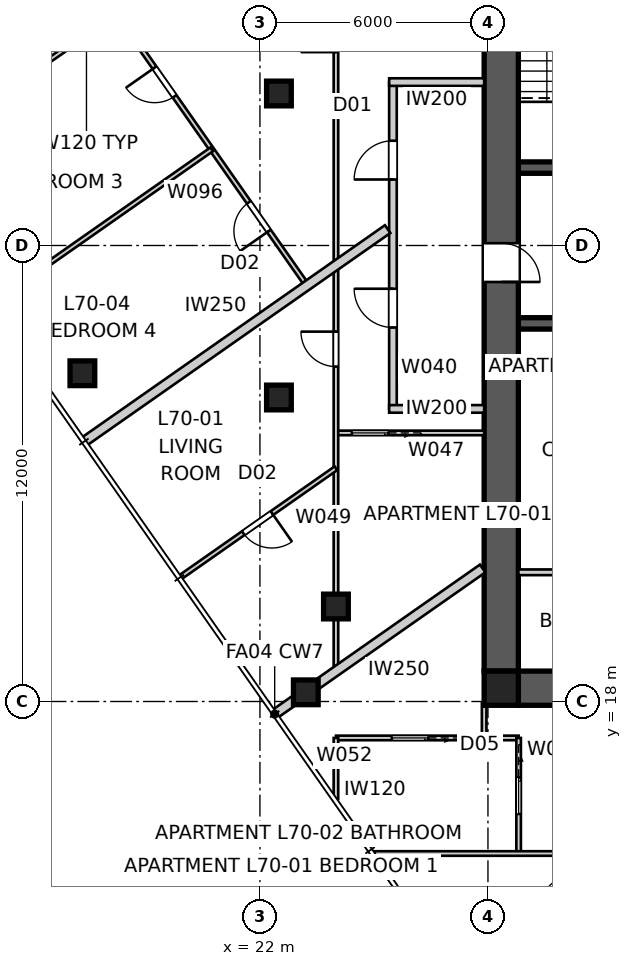
"""IFC4 building model, lengths in metres.
Left out: names, types, materials, properties, quantities, classifications, styles, units other than length and angle.
Written with IfcOpenShell. Run it as: python <this file> out.ifc"""

import sys

from ifc_helpers import new_model, si_unit, direction, frame, frame_2d, origin, origin_2d, place, context, subcontext, project, spatial, polyline, rectangle, outline, extrude, element, fill, save


model = new_model("IFC4")
c1 = context("Model", 3, precision=1e-05, world=origin(), true_north=direction((0.0, 1.0)))
c2 = subcontext(c1, "Body", "Model", "MODEL_VIEW")
j1 = project(units=[si_unit("LENGTHUNIT", "METRE"), si_unit("PLANEANGLEUNIT", "RADIAN")], contexts=[c1])
p1 = place(None, origin())
s1 = spatial("IfcSite", under=j1, at=p1, CompositionType="ELEMENT")
p2 = place(p1, origin())
s2 = spatial("IfcBuilding", under=s1, at=p2, CompositionType="ELEMENT")
p3 = place(p2, frame((0.0, 0.0, 254.0)))
s3 = spatial("IfcBuildingStorey", under=s2, at=p3, CompositionType="ELEMENT", Elevation=254.0)
p4 = place(p3, frame((51.2, 18.35, 0.0), z_axis=(0.0, 0.0, 1.0), x_axis=(-1.0, 0.0, 0.0)))
e1 = element("IfcWall", 1, at=p4, inside=s3, PredefinedType="SHEAR", context=c2, shape_type="SweptSolid", body=[
    extrude(outline(polyline([(0.0, -0.45), (22.4, -0.45), (22.4, -0.025), (22.85, -0.025), (22.85, 0.025), (22.4, 0.025), (22.4, 0.45), (0.0, 0.45), (0.0, 0.025), (-0.45, 0.025), (-0.45, -0.025), (0.0, -0.025), (0.0, -0.45)])), origin(), (0.0, 0.0, 1.0), 3.4),
])
p5 = place(p3, frame((28.35, 41.2, 0.0), z_axis=(0.0, 0.0, 1.0), x_axis=(0.0, -1.0, 0.0)))
e2 = element("IfcWall", 2, at=p5, inside=s3, PredefinedType="SHEAR", context=c2, shape_type="SweptSolid", body=[
    extrude(outline(polyline([(0.0, -0.45), (22.4, -0.45), (22.4, -0.025), (22.85, -0.025), (22.85, 0.025), (22.4, 0.025), (22.4, 0.45), (0.0, 0.45), (0.0, 0.025), (-0.45, 0.025), (-0.45, -0.025), (0.0, -0.025), (0.0, -0.45)])), origin(), (0.0, 0.0, 1.0), 3.4),
])
p6 = place(p5, frame((11.14, 0.0, 0.0)))
e3 = element("IfcOpeningElement", 3, at=p6, cuts=e2, PredefinedType="OPENING", context=c2, shape_type="SweptSolid", body=[
    extrude(rectangle(XDim=1.02, YDim=2.4, at=frame_2d((0.51, 1.2))), frame((0.0, 0.46, 0.0), z_axis=(0.0, -1.0, 0.0), x_axis=(1.0, 0.0, 0.0)), (0.0, 0.0, 1.0), 0.92),
])
p7 = place(p3, frame((28.8, 32.05, 0.0), z_axis=(0.0, 0.0, 1.0), x_axis=(1.0, 0.0, 0.0)))
e4 = element("IfcWall", 4, at=p7, inside=s3, PredefinedType="SHEAR", context=c2, shape_type="SweptSolid", body=[
    extrude(rectangle(XDim=22.4, YDim=0.3, at=frame_2d((11.2, 0.0))), origin(), (0.0, 0.0, 1.0), 3.4),
])
p8 = place(p7, frame((19.04, 0.0, 0.0)))
e5 = element("IfcOpeningElement", 5, at=p8, cuts=e4, PredefinedType="OPENING", context=c2, shape_type="SweptSolid", body=[
    extrude(rectangle(XDim=0.92, YDim=2.1, at=frame_2d((0.46, 1.05))), frame((0.0, 0.16, 0.0), z_axis=(0.0, -1.0, 0.0), x_axis=(1.0, 0.0, 0.0)), (0.0, 0.0, 1.0), 0.32),
])
p9 = place(p7, frame((1.265, 0.0, 0.0)))
e6 = element("IfcOpeningElement", 6, at=p9, cuts=e4, PredefinedType="OPENING", context=c2, shape_type="SweptSolid", body=[
    extrude(rectangle(XDim=1.02, YDim=2.1, at=frame_2d((0.51, 1.05))), frame((0.0, 0.16, 0.0), z_axis=(0.0, -1.0, 0.0), x_axis=(1.0, 0.0, 0.0)), (0.0, 0.0, 1.0), 0.32),
])
p10 = place(p7, frame((4.015, 0.0, 0.0)))
e7 = element("IfcOpeningElement", 7, at=p10, cuts=e4, PredefinedType="OPENING", context=c2, shape_type="SweptSolid", body=[
    extrude(rectangle(XDim=0.92, YDim=2.1, at=frame_2d((0.46, 1.05))), frame((0.0, 0.16, 0.0), z_axis=(0.0, -1.0, 0.0), x_axis=(1.0, 0.0, 0.0)), (0.0, 0.0, 1.0), 0.32),
])
p11 = place(p7, frame((6.115, 0.0, 0.0)))
e8 = element("IfcOpeningElement", 8, at=p11, cuts=e4, PredefinedType="OPENING", context=c2, shape_type="SweptSolid", body=[
    extrude(rectangle(XDim=0.92, YDim=2.1, at=frame_2d((0.46, 1.05))), frame((0.0, 0.16, 0.0), z_axis=(0.0, -1.0, 0.0), x_axis=(1.0, 0.0, 0.0)), (0.0, 0.0, 1.0), 0.32),
])
p12 = place(p7, frame((9.79, 0.0, 0.0)))
e9 = element("IfcOpeningElement", 9, at=p12, cuts=e4, PredefinedType="OPENING", context=c2, shape_type="SweptSolid", body=[
    extrude(rectangle(XDim=0.92, YDim=2.1, at=frame_2d((0.46, 1.05))), frame((0.0, 0.16, 0.0), z_axis=(0.0, -1.0, 0.0), x_axis=(1.0, 0.0, 0.0)), (0.0, 0.0, 1.0), 0.32),
])
p13 = place(p7, frame((12.05, 0.0, 0.0)))
e10 = element("IfcOpeningElement", 10, at=p13, cuts=e4, PredefinedType="OPENING", context=c2, shape_type="SweptSolid", body=[
    extrude(rectangle(XDim=1.1, YDim=2.1, at=frame_2d((0.55, 1.05))), frame((0.0, 0.16, 0.0), z_axis=(0.0, -1.0, 0.0), x_axis=(1.0, 0.0, 0.0)), (0.0, 0.0, 1.0), 0.32),
])
p14 = place(p7, frame((14.85, 0.0, 0.0)))
e11 = element("IfcOpeningElement", 11, at=p14, cuts=e4, PredefinedType="OPENING", context=c2, shape_type="SweptSolid", body=[
    extrude(rectangle(XDim=1.1, YDim=2.1, at=frame_2d((0.55, 1.05))), frame((0.0, 0.16, 0.0), z_axis=(0.0, -1.0, 0.0), x_axis=(1.0, 0.0, 0.0)), (0.0, 0.0, 1.0), 0.32),
])
p15 = place(p3, frame((51.2, 27.95, 0.0), z_axis=(0.0, 0.0, 1.0), x_axis=(-1.0, 0.0, 0.0)))
e12 = element("IfcWall", 12, at=p15, inside=s3, PredefinedType="SHEAR", context=c2, shape_type="SweptSolid", body=[
    extrude(rectangle(XDim=22.4, YDim=0.3, at=frame_2d((11.2, 0.0))), origin(), (0.0, 0.0, 1.0), 3.4),
])
p16 = place(p15, frame((19.04, 0.0, 0.0)))
e13 = element("IfcOpeningElement", 13, at=p16, cuts=e12, PredefinedType="OPENING", context=c2, shape_type="SweptSolid", body=[
    extrude(rectangle(XDim=0.92, YDim=2.1, at=frame_2d((0.46, 1.05))), frame((0.0, 0.16, 0.0), z_axis=(0.0, -1.0, 0.0), x_axis=(1.0, 0.0, 0.0)), (0.0, 0.0, 1.0), 0.32),
])
p17 = place(p15, frame((1.265, 0.0, 0.0)))
e14 = element("IfcOpeningElement", 14, at=p17, cuts=e12, PredefinedType="OPENING", context=c2, shape_type="SweptSolid", body=[
    extrude(rectangle(XDim=1.02, YDim=2.1, at=frame_2d((0.51, 1.05))), frame((0.0, 0.16, 0.0), z_axis=(0.0, -1.0, 0.0), x_axis=(1.0, 0.0, 0.0)), (0.0, 0.0, 1.0), 0.32),
])
p18 = place(p15, frame((4.015, 0.0, 0.0)))
e15 = element("IfcOpeningElement", 15, at=p18, cuts=e12, PredefinedType="OPENING", context=c2, shape_type="SweptSolid", body=[
    extrude(rectangle(XDim=0.92, YDim=2.1, at=frame_2d((0.46, 1.05))), frame((0.0, 0.16, 0.0), z_axis=(0.0, -1.0, 0.0), x_axis=(1.0, 0.0, 0.0)), (0.0, 0.0, 1.0), 0.32),
])
p19 = place(p15, frame((9.34, 0.0, 0.0)))
e16 = element("IfcOpeningElement", 16, at=p19, cuts=e12, PredefinedType="OPENING", context=c2, shape_type="SweptSolid", body=[
    extrude(rectangle(XDim=0.92, YDim=2.1, at=frame_2d((0.46, 1.05))), frame((0.0, 0.16, 0.0), z_axis=(0.0, -1.0, 0.0), x_axis=(1.0, 0.0, 0.0)), (0.0, 0.0, 1.0), 0.32),
])
p20 = place(p15, frame((7.015, 0.0, 0.0)))
e17 = element("IfcOpeningElement", 17, at=p20, cuts=e12, PredefinedType="OPENING", context=c2, shape_type="SweptSolid", body=[
    extrude(rectangle(XDim=0.92, YDim=2.1, at=frame_2d((0.46, 1.05))), frame((0.0, 0.16, 0.0), z_axis=(0.0, -1.0, 0.0), x_axis=(1.0, 0.0, 0.0)), (0.0, 0.0, 1.0), 0.32),
])
p21 = place(p15, frame((12.05, 0.0, 0.0)))
e18 = element("IfcOpeningElement", 18, at=p21, cuts=e12, PredefinedType="OPENING", context=c2, shape_type="SweptSolid", body=[
    extrude(rectangle(XDim=1.1, YDim=2.1, at=frame_2d((0.55, 1.05))), frame((0.0, 0.16, 0.0), z_axis=(0.0, -1.0, 0.0), x_axis=(1.0, 0.0, 0.0)), (0.0, 0.0, 1.0), 0.32),
])
p22 = place(p15, frame((14.85, 0.0, 0.0)))
e19 = element("IfcOpeningElement", 19, at=p22, cuts=e12, PredefinedType="OPENING", context=c2, shape_type="SweptSolid", body=[
    extrude(rectangle(XDim=1.1, YDim=2.1, at=frame_2d((0.55, 1.05))), frame((0.0, 0.16, 0.0), z_axis=(0.0, -1.0, 0.0), x_axis=(1.0, 0.0, 0.0)), (0.0, 0.0, 1.0), 0.32),
])
p23 = place(p3, frame((28.35, 18.35, 0.0), z_axis=(0.0, 0.0, 1.0), x_axis=(1.0, 0.0, 0.0)))
e20 = element("IfcColumn", 20, at=p23, inside=s3, PredefinedType="COLUMN", context=c2, shape_type="SweptSolid", body=[
    extrude(rectangle(XDim=0.9, YDim=0.9, at=origin_2d()), origin(), (0.0, 0.0, 1.0), 3.4),
])
for number, where, z_axis, x_axis in (
    (21, (17.328, 26.638, 0.0), (0.0, 0.0, 1.0), (1.0, 0.0, 0.0)),
    (22, (23.207, 18.242, 0.0), (0.0, 0.0, 1.0), (1.0, 0.0, 0.0)),
    (23, (22.5, 34.0, 0.0), (0.0, 0.0, 1.0), (1.0, 0.0, 0.0)),
    (24, (22.5, 26.0, 0.0), (0.0, 0.0, 1.0), (1.0, 0.0, 0.0)),
    (25, (24.0, 20.5, 0.0), (0.0, 0.0, 1.0), (1.0, 0.0, 0.0)),
):
    element("IfcColumn", number, at=place(p3, frame(where, z_axis=z_axis, x_axis=x_axis)), inside=s3, PredefinedType="COLUMN", context=c2, shape_type="SweptSolid", body=[
        extrude(rectangle(XDim=0.65, YDim=0.65, at=origin_2d()), origin(), (0.0, 0.0, 1.0), 3.4),
    ])
p24 = place(p3, frame((25.5, 25.7, 0.0), z_axis=(0.0, 0.0, 1.0), x_axis=(0.0, 1.0, 0.0)))
e26 = element("IfcWall", 26, at=p24, inside=s3, PredefinedType="PARTITIONING", context=c2, shape_type="SweptSolid", body=[
    extrude(rectangle(XDim=8.6, YDim=0.2, at=frame_2d((4.3, 0.0))), origin(), (0.0, 0.0, 1.0), 3.25),
])
p25 = place(p24, frame((2.142, 0.0, 0.0)))
e27 = element("IfcOpeningElement", 27, at=p25, cuts=e26, PredefinedType="OPENING", context=c2, shape_type="SweptSolid", body=[
    extrude(rectangle(XDim=1.02, YDim=2.34, at=frame_2d((0.51, 1.17))), frame((0.0, 0.11, 0.0), z_axis=(0.0, -1.0, 0.0), x_axis=(1.0, 0.0, 0.0)), (0.0, 0.0, 1.0), 0.22),
])
p26 = place(p24, frame((6.037, 0.0, 0.0)))
e28 = element("IfcOpeningElement", 28, at=p26, cuts=e26, PredefinedType="OPENING", context=c2, shape_type="SweptSolid", body=[
    extrude(rectangle(XDim=1.02, YDim=2.34, at=frame_2d((0.51, 1.17))), frame((0.0, 0.11, 0.0), z_axis=(0.0, -1.0, 0.0), x_axis=(1.0, 0.0, 0.0)), (0.0, 0.0, 1.0), 0.22),
])
for number, where, z_axis, x_axis in (
    (29, (27.9, 34.3, 0.0), (0.0, 0.0, 1.0), (-1.0, 0.0, 0.0)),
    (30, (27.9, 25.7, 0.0), (0.0, 0.0, 1.0), (-1.0, 0.0, 0.0)),
):
    element("IfcWall", number, at=place(p3, frame(where, z_axis=z_axis, x_axis=x_axis)), inside=s3, PredefinedType="PARTITIONING", context=c2, shape_type="SweptSolid", body=[
        extrude(rectangle(XDim=2.5, YDim=0.2, at=frame_2d((1.25, 0.0))), origin(), (0.0, 0.0, 1.0), 3.25),
    ])
p27 = place(p3, frame((22.388, 17.668, 0.0), z_axis=(0.0, 0.0, 1.0), x_axis=(0.819161528122, 0.573562891796, 0.0)))
e31 = element("IfcWall", 31, at=p27, inside=s3, PredefinedType="PARTITIONING", context=c2, shape_type="SweptSolid", body=[
    extrude(rectangle(XDim=6.681, YDim=0.25, at=frame_2d((3.341, 0.0))), origin(), (0.0, 0.0, 1.0), 3.25),
])
p28 = place(p3, frame((17.369, 24.836, 0.0), z_axis=(0.0, 0.0, 1.0), x_axis=(0.81915902312, 0.573566469418, 0.0)))
e32 = element("IfcWall", 32, at=p28, inside=s3, PredefinedType="PARTITIONING", context=c2, shape_type="SweptSolid", body=[
    extrude(rectangle(XDim=9.756, YDim=0.25, at=frame_2d((4.878, 0.0))), origin(), (0.0, 0.0, 1.0), 3.25),
])
p29 = place(p3, frame((34.25, 21.4, 0.0), z_axis=(0.0, 0.0, 1.0), x_axis=(-1.0, 0.0, 0.0)))
e33 = element("IfcWall", 33, at=p29, inside=s3, PredefinedType="SOLIDWALL", context=c2, shape_type="SweptSolid", body=[
    extrude(rectangle(XDim=5.45, YDim=0.15, at=frame_2d((2.725, 0.0))), origin(), (0.0, 0.0, 1.0), 3.25),
])
p30 = place(p29, frame((2.265, 0.0, 0.0)))
e34 = element("IfcOpeningElement", 34, at=p30, cuts=e33, PredefinedType="OPENING", context=c2, shape_type="SweptSolid", body=[
    extrude(rectangle(XDim=0.92, YDim=2.1, at=frame_2d((0.46, 1.05))), frame((0.0, 0.085, 0.0), z_axis=(0.0, -1.0, 0.0), x_axis=(1.0, 0.0, 0.0)), (0.0, 0.0, 1.0), 0.17),
])
p31 = place(p3, frame((27.9, 25.068, 0.0), z_axis=(0.0, 0.0, 1.0), x_axis=(-1.0, 0.0, 0.0)))
e35 = element("IfcWall", 35, at=p31, inside=s3, PredefinedType="PARTITIONING", context=c2, shape_type="SweptSolid", body=[
    extrude(rectangle(XDim=3.9, YDim=0.12, at=frame_2d((1.95, 0.0))), origin(), (0.0, 0.0, 1.0), 3.25),
])
p32 = place(p31, frame((2.52, 0.0, 0.0)))
e36 = element("IfcOpeningElement", 36, at=p32, cuts=e35, PredefinedType="OPENING", context=c2, shape_type="SweptSolid", body=[
    extrude(rectangle(XDim=0.96, YDim=2.1, at=frame_2d((0.48, 1.05))), frame((0.0, 0.07, 0.0), z_axis=(0.0, -1.0, 0.0), x_axis=(1.0, 0.0, 0.0)), (0.0, 0.0, 1.0), 0.14),
])
p33 = place(p3, frame((24.0, 18.797, 0.0), z_axis=(0.0, 0.0, 1.0), x_axis=(0.0, 1.0, 0.0)))
e37 = element("IfcWall", 37, at=p33, inside=s3, PredefinedType="PARTITIONING", context=c2, shape_type="SweptSolid", body=[
    extrude(rectangle(XDim=26.198, YDim=0.12, at=frame_2d((13.099, 0.0))), origin(), (0.0, 0.0, 1.0), 2.549),
])
p34 = place(p33, frame((8.016, 0.0, 0.0)))
e38 = element("IfcOpeningElement", 38, at=p34, cuts=e37, PredefinedType="OPENING", context=c2, shape_type="SweptSolid", body=[
    extrude(rectangle(XDim=0.92, YDim=2.34, at=frame_2d((0.46, 1.17))), frame((0.0, 0.07, 0.0), z_axis=(0.0, -1.0, 0.0), x_axis=(1.0, 0.0, 0.0)), (0.0, 0.0, 1.0), 0.14),
])
p35 = place(p33, frame((16.292, 0.0, 0.0)))
e39 = element("IfcOpeningElement", 39, at=p35, cuts=e37, PredefinedType="OPENING", context=c2, shape_type="SweptSolid", body=[
    extrude(rectangle(XDim=0.92, YDim=2.34, at=frame_2d((0.46, 1.17))), frame((0.0, 0.07, 0.0), z_axis=(0.0, -1.0, 0.0), x_axis=(1.0, 0.0, 0.0)), (0.0, 0.0, 1.0), 0.14),
])
p36 = place(p3, frame((24.0, 24.138, 0.0), z_axis=(0.0, 0.0, 1.0), x_axis=(-0.819144584763, -0.57358708951, 0.0)))
e40 = element("IfcWall", 40, at=p36, inside=s3, PredefinedType="PARTITIONING", context=c2, shape_type="SweptSolid", body=[
    extrude(rectangle(XDim=4.991, YDim=0.12, at=frame_2d((2.496, 0.0))), origin(), (0.0, 0.0, 1.0), 3.25),
])
p37 = place(p36, frame((2.055, 0.0, 0.0)))
e41 = element("IfcOpeningElement", 41, at=p37, cuts=e40, PredefinedType="OPENING", context=c2, shape_type="SweptSolid", body=[
    extrude(rectangle(XDim=0.92, YDim=2.34, at=frame_2d((0.46, 1.17))), frame((0.0, 0.07, 0.0), z_axis=(0.0, -1.0, 0.0), x_axis=(1.0, 0.0, 0.0)), (0.0, 0.0, 1.0), 0.14),
])
p38 = place(p3, frame((28.807, 17.041, 0.0), z_axis=(0.0, 0.0, 1.0), x_axis=(-1.0, 0.0, 0.0)))
e42 = element("IfcWall", 42, at=p38, inside=s3, PredefinedType="PARTITIONING", context=c2, shape_type="SweptSolid", body=[
    extrude(rectangle(XDim=4.807, YDim=0.12, at=frame_2d((2.404, 0.0))), origin(), (0.0, 0.0, 1.0), 3.25),
])
p39 = place(p38, frame((2.377, 0.0, 0.0)))
e43 = element("IfcOpeningElement", 43, at=p39, cuts=e42, PredefinedType="OPENING", context=c2, shape_type="SweptSolid", body=[
    extrude(rectangle(XDim=0.96, YDim=2.1, at=frame_2d((0.48, 1.05))), frame((0.0, 0.07, 0.0), z_axis=(0.0, -1.0, 0.0), x_axis=(1.0, 0.0, 0.0)), (0.0, 0.0, 1.0), 0.14),
])
p40 = place(p3, frame((24.0, 17.041, 0.0), z_axis=(0.0, 0.0, 1.0), x_axis=(0.0, -1.0, 0.0)))
e44 = element("IfcWall", 44, at=p40, inside=s3, PredefinedType="PARTITIONING", context=c2, shape_type="SweptSolid", body=[
    extrude(rectangle(XDim=1.605, YDim=0.12, at=frame_2d((0.803, 0.0))), origin(), (0.0, 0.0, 1.0), 3.25),
])
p41 = place(p3, frame((27.9, 17.95, 0.0), z_axis=(0.0, 0.0, 1.0), x_axis=(0.0, -1.0, 0.0)))
e45 = element("IfcWall", 45, at=p41, inside=s3, PredefinedType="PARTITIONING", context=c2, shape_type="SweptSolid", body=[
    extrude(rectangle(XDim=0.909, YDim=0.12, at=frame_2d((0.454, 0.0))), origin(), (0.0, 0.0, 1.0), 3.25),
])
p42 = place(p3, frame((28.807, 17.041, 0.0), z_axis=(0.0, 0.0, 1.0), x_axis=(0.0, -1.0, 0.0)))
e46 = element("IfcWall", 46, at=p42, inside=s3, PredefinedType="PARTITIONING", context=c2, shape_type="SweptSolid", body=[
    extrude(rectangle(XDim=3.041, YDim=0.12, at=frame_2d((1.521, 0.0))), origin(), (0.0, 0.0, 1.0), 3.25),
])
p43 = place(p42, frame((1.041, 0.0, 0.0)))
e47 = element("IfcOpeningElement", 47, at=p43, cuts=e46, PredefinedType="OPENING", context=c2, shape_type="SweptSolid", body=[
    extrude(rectangle(XDim=0.96, YDim=2.1, at=frame_2d((0.48, 1.05))), frame((0.0, 0.07, 0.0), z_axis=(0.0, -1.0, 0.0), x_axis=(1.0, 0.0, 0.0)), (0.0, 0.0, 1.0), 0.14),
])
p44 = place(p3, frame((47.476, 14.0, 0.0), z_axis=(0.0, 0.0, 1.0), x_axis=(-1.0, 0.0, 0.0)))
e48 = element("IfcWall", 48, at=p44, inside=s3, PredefinedType="PARTITIONING", context=c2, shape_type="SweptSolid", body=[
    extrude(rectangle(XDim=22.471, YDim=0.12, at=frame_2d((11.235, 0.0))), origin(), (0.0, 0.0, 1.0), 2.549),
])
p45 = place(p44, frame((7.664, 0.0, 0.0)))
e49 = element("IfcOpeningElement", 49, at=p45, cuts=e48, PredefinedType="OPENING", context=c2, shape_type="SweptSolid", body=[
    extrude(rectangle(XDim=0.96, YDim=2.1, at=frame_2d((0.48, 1.05))), frame((0.0, 0.07, 0.0), z_axis=(0.0, -1.0, 0.0), x_axis=(1.0, 0.0, 0.0)), (0.0, 0.0, 1.0), 0.14),
])
p46 = place(p3, frame((27.44, 10.523, 0.0), z_axis=(0.0, 0.0, 1.0), x_axis=(0.81915432861, 0.573573173989, 0.0)))
e50 = element("IfcWall", 50, at=p46, inside=s3, PredefinedType="PARTITIONING", context=c2, shape_type="SweptSolid", body=[
    extrude(rectangle(XDim=6.061, YDim=0.12, at=frame_2d((3.031, 0.0))), origin(), (0.0, 0.0, 1.0), 3.25),
])
p47 = place(p46, frame((2.551, 0.0, 0.0)))
e51 = element("IfcOpeningElement", 51, at=p47, cuts=e50, PredefinedType="OPENING", context=c2, shape_type="SweptSolid", body=[
    extrude(rectangle(XDim=0.92, YDim=2.34, at=frame_2d((0.46, 1.17))), frame((0.0, 0.07, 0.0), z_axis=(0.0, -1.0, 0.0), x_axis=(1.0, 0.0, 0.0)), (0.0, 0.0, 1.0), 0.14),
])
p48 = place(p3, frame((23.24, 28.947, 0.0), z_axis=(0.0, 0.0, 1.0), x_axis=(-0.573582185905, 0.819148018378, 0.0)))
e52 = element("IfcWall", 52, at=p48, inside=s3, PredefinedType="PARTITIONING", context=c2, shape_type="SweptSolid", body=[
    extrude(rectangle(XDim=8.75, YDim=0.12, at=frame_2d((4.375, 0.0))), origin(), (0.0, 0.0, 1.0), 3.25),
])
p49 = place(p48, frame((6.078, 0.0, 0.0)))
e53 = element("IfcOpeningElement", 53, at=p49, cuts=e52, PredefinedType="OPENING", context=c2, shape_type="SweptSolid", body=[
    extrude(rectangle(XDim=0.92, YDim=2.34, at=frame_2d((0.46, 1.17))), frame((0.0, 0.07, 0.0), z_axis=(0.0, -1.0, 0.0), x_axis=(1.0, 0.0, 0.0)), (0.0, 0.0, 1.0), 0.14),
])
p50 = place(p48, frame((1.752, 0.0, 0.0)))
e54 = element("IfcOpeningElement", 54, at=p50, cuts=e52, PredefinedType="OPENING", context=c2, shape_type="SweptSolid", body=[
    extrude(rectangle(XDim=0.92, YDim=2.34, at=frame_2d((0.46, 1.17))), frame((0.0, 0.07, 0.0), z_axis=(0.0, -1.0, 0.0), x_axis=(1.0, 0.0, 0.0)), (0.0, 0.0, 1.0), 0.14),
])
p51 = place(p3, frame((15.66, 34.321, 0.0), z_axis=(0.0, 0.0, 1.0), x_axis=(0.819139307094, 0.573594626521, 0.0)))
e55 = element("IfcWall", 55, at=p51, inside=s3, PredefinedType="PARTITIONING", context=c2, shape_type="SweptSolid", body=[
    extrude(rectangle(XDim=4.335, YDim=0.12, at=frame_2d((2.167, 0.0))), origin(), (0.0, 0.0, 1.0), 3.25),
])
p52 = place(p3, frame((20.731, 32.53, 0.0), z_axis=(0.0, 0.0, 1.0), x_axis=(-0.819153056029, -0.573574991434, 0.0)))
e56 = element("IfcWall", 56, at=p52, inside=s3, PredefinedType="PARTITIONING", context=c2, shape_type="SweptSolid", body=[
    extrude(rectangle(XDim=7.127, YDim=0.12, at=frame_2d((3.563, 0.0))), origin(), (0.0, 0.0, 1.0), 3.25),
])
p53 = place(p25, origin())
e57 = element("IfcDoor", 57, at=p53, inside=s3, OperationType="SINGLE_SWING_RIGHT", PredefinedType="DOOR", context=c2, shape_type="SweptSolid", body=[
    extrude(rectangle(XDim=1.02, YDim=2.34, at=frame_2d((0.51, 1.17))), frame((0.0, 0.025, 0.0), z_axis=(0.0, -1.0, 0.0), x_axis=(1.0, 0.0, 0.0)), (0.0, 0.0, 1.0), 0.05),
])
fill(e27, e57)
p54 = place(p26, origin())
e58 = element("IfcDoor", 58, at=p54, inside=s3, OperationType="SINGLE_SWING_LEFT", PredefinedType="DOOR", context=c2, shape_type="SweptSolid", body=[
    extrude(rectangle(XDim=1.02, YDim=2.34, at=frame_2d((0.51, 1.17))), frame((0.0, 0.025, 0.0), z_axis=(0.0, -1.0, 0.0), x_axis=(1.0, 0.0, 0.0)), (0.0, 0.0, 1.0), 0.05),
])
fill(e28, e58)
p55 = place(p34, origin())
e59 = element("IfcDoor", 59, at=p55, inside=s3, OperationType="SINGLE_SWING_RIGHT", PredefinedType="DOOR", context=c2, shape_type="SweptSolid", body=[
    extrude(rectangle(XDim=0.92, YDim=2.34, at=frame_2d((0.46, 1.17))), frame((0.0, 0.025, 0.0), z_axis=(0.0, -1.0, 0.0), x_axis=(1.0, 0.0, 0.0)), (0.0, 0.0, 1.0), 0.05),
])
fill(e38, e59)
p56 = place(p32, origin())
e60 = element("IfcDoor", 60, at=p56, inside=s3, OperationType="SLIDING_TO_LEFT", PredefinedType="DOOR", context=c2, shape_type="SweptSolid", body=[
    extrude(rectangle(XDim=0.96, YDim=2.1, at=frame_2d((0.48, 1.05))), frame((0.0, 0.025, 0.0), z_axis=(0.0, -1.0, 0.0), x_axis=(1.0, 0.0, 0.0)), (0.0, 0.0, 1.0), 0.05),
])
fill(e36, e60)
p57 = place(p37, origin())
e61 = element("IfcDoor", 61, at=p57, inside=s3, OperationType="SINGLE_SWING_LEFT", PredefinedType="DOOR", context=c2, shape_type="SweptSolid", body=[
    extrude(rectangle(XDim=0.92, YDim=2.34, at=frame_2d((0.46, 1.17))), frame((0.0, 0.025, 0.0), z_axis=(0.0, -1.0, 0.0), x_axis=(1.0, 0.0, 0.0)), (0.0, 0.0, 1.0), 0.05),
])
fill(e41, e61)
p58 = place(p49, origin())
e62 = element("IfcDoor", 62, at=p58, inside=s3, OperationType="SINGLE_SWING_RIGHT", PredefinedType="DOOR", context=c2, shape_type="SweptSolid", body=[
    extrude(rectangle(XDim=0.92, YDim=2.34, at=frame_2d((0.46, 1.17))), frame((0.0, 0.025, 0.0), z_axis=(0.0, -1.0, 0.0), x_axis=(1.0, 0.0, 0.0)), (0.0, 0.0, 1.0), 0.05),
])
fill(e53, e62)
p59 = place(p50, origin())
e63 = element("IfcDoor", 63, at=p59, inside=s3, OperationType="SINGLE_SWING_LEFT", PredefinedType="DOOR", context=c2, shape_type="SweptSolid", body=[
    extrude(rectangle(XDim=0.92, YDim=2.34, at=frame_2d((0.46, 1.17))), frame((0.0, 0.025, 0.0), z_axis=(0.0, -1.0, 0.0), x_axis=(1.0, 0.0, 0.0)), (0.0, 0.0, 1.0), 0.05),
])
fill(e54, e63)
p60 = place(p43, origin())
e64 = element("IfcDoor", 64, at=p60, inside=s3, OperationType="SLIDING_TO_LEFT", PredefinedType="DOOR", context=c2, shape_type="SweptSolid", body=[
    extrude(rectangle(XDim=0.96, YDim=2.1, at=frame_2d((0.48, 1.05))), frame((0.0, 0.025, 0.0), z_axis=(0.0, -1.0, 0.0), x_axis=(1.0, 0.0, 0.0)), (0.0, 0.0, 1.0), 0.05),
])
fill(e47, e64)
p61 = place(p39, origin())
e65 = element("IfcDoor", 65, at=p61, inside=s3, OperationType="SLIDING_TO_LEFT", PredefinedType="DOOR", context=c2, shape_type="SweptSolid", body=[
    extrude(rectangle(XDim=0.96, YDim=2.1, at=frame_2d((0.48, 1.05))), frame((0.0, 0.025, 0.0), z_axis=(0.0, -1.0, 0.0), x_axis=(1.0, 0.0, 0.0)), (0.0, 0.0, 1.0), 0.05),
])
fill(e43, e65)
p62 = place(p6, origin())
e66 = element("IfcDoor", 66, at=p62, inside=s3, OperationType="SINGLE_SWING_RIGHT", PredefinedType="DOOR", context=c2, shape_type="SweptSolid", body=[
    extrude(rectangle(XDim=1.02, YDim=2.4, at=frame_2d((0.51, 1.2))), frame((0.0, 0.025, 0.0), z_axis=(0.0, -1.0, 0.0), x_axis=(1.0, 0.0, 0.0)), (0.0, 0.0, 1.0), 0.05),
])
fill(e3, e66)
save(model, sys.argv[1])
